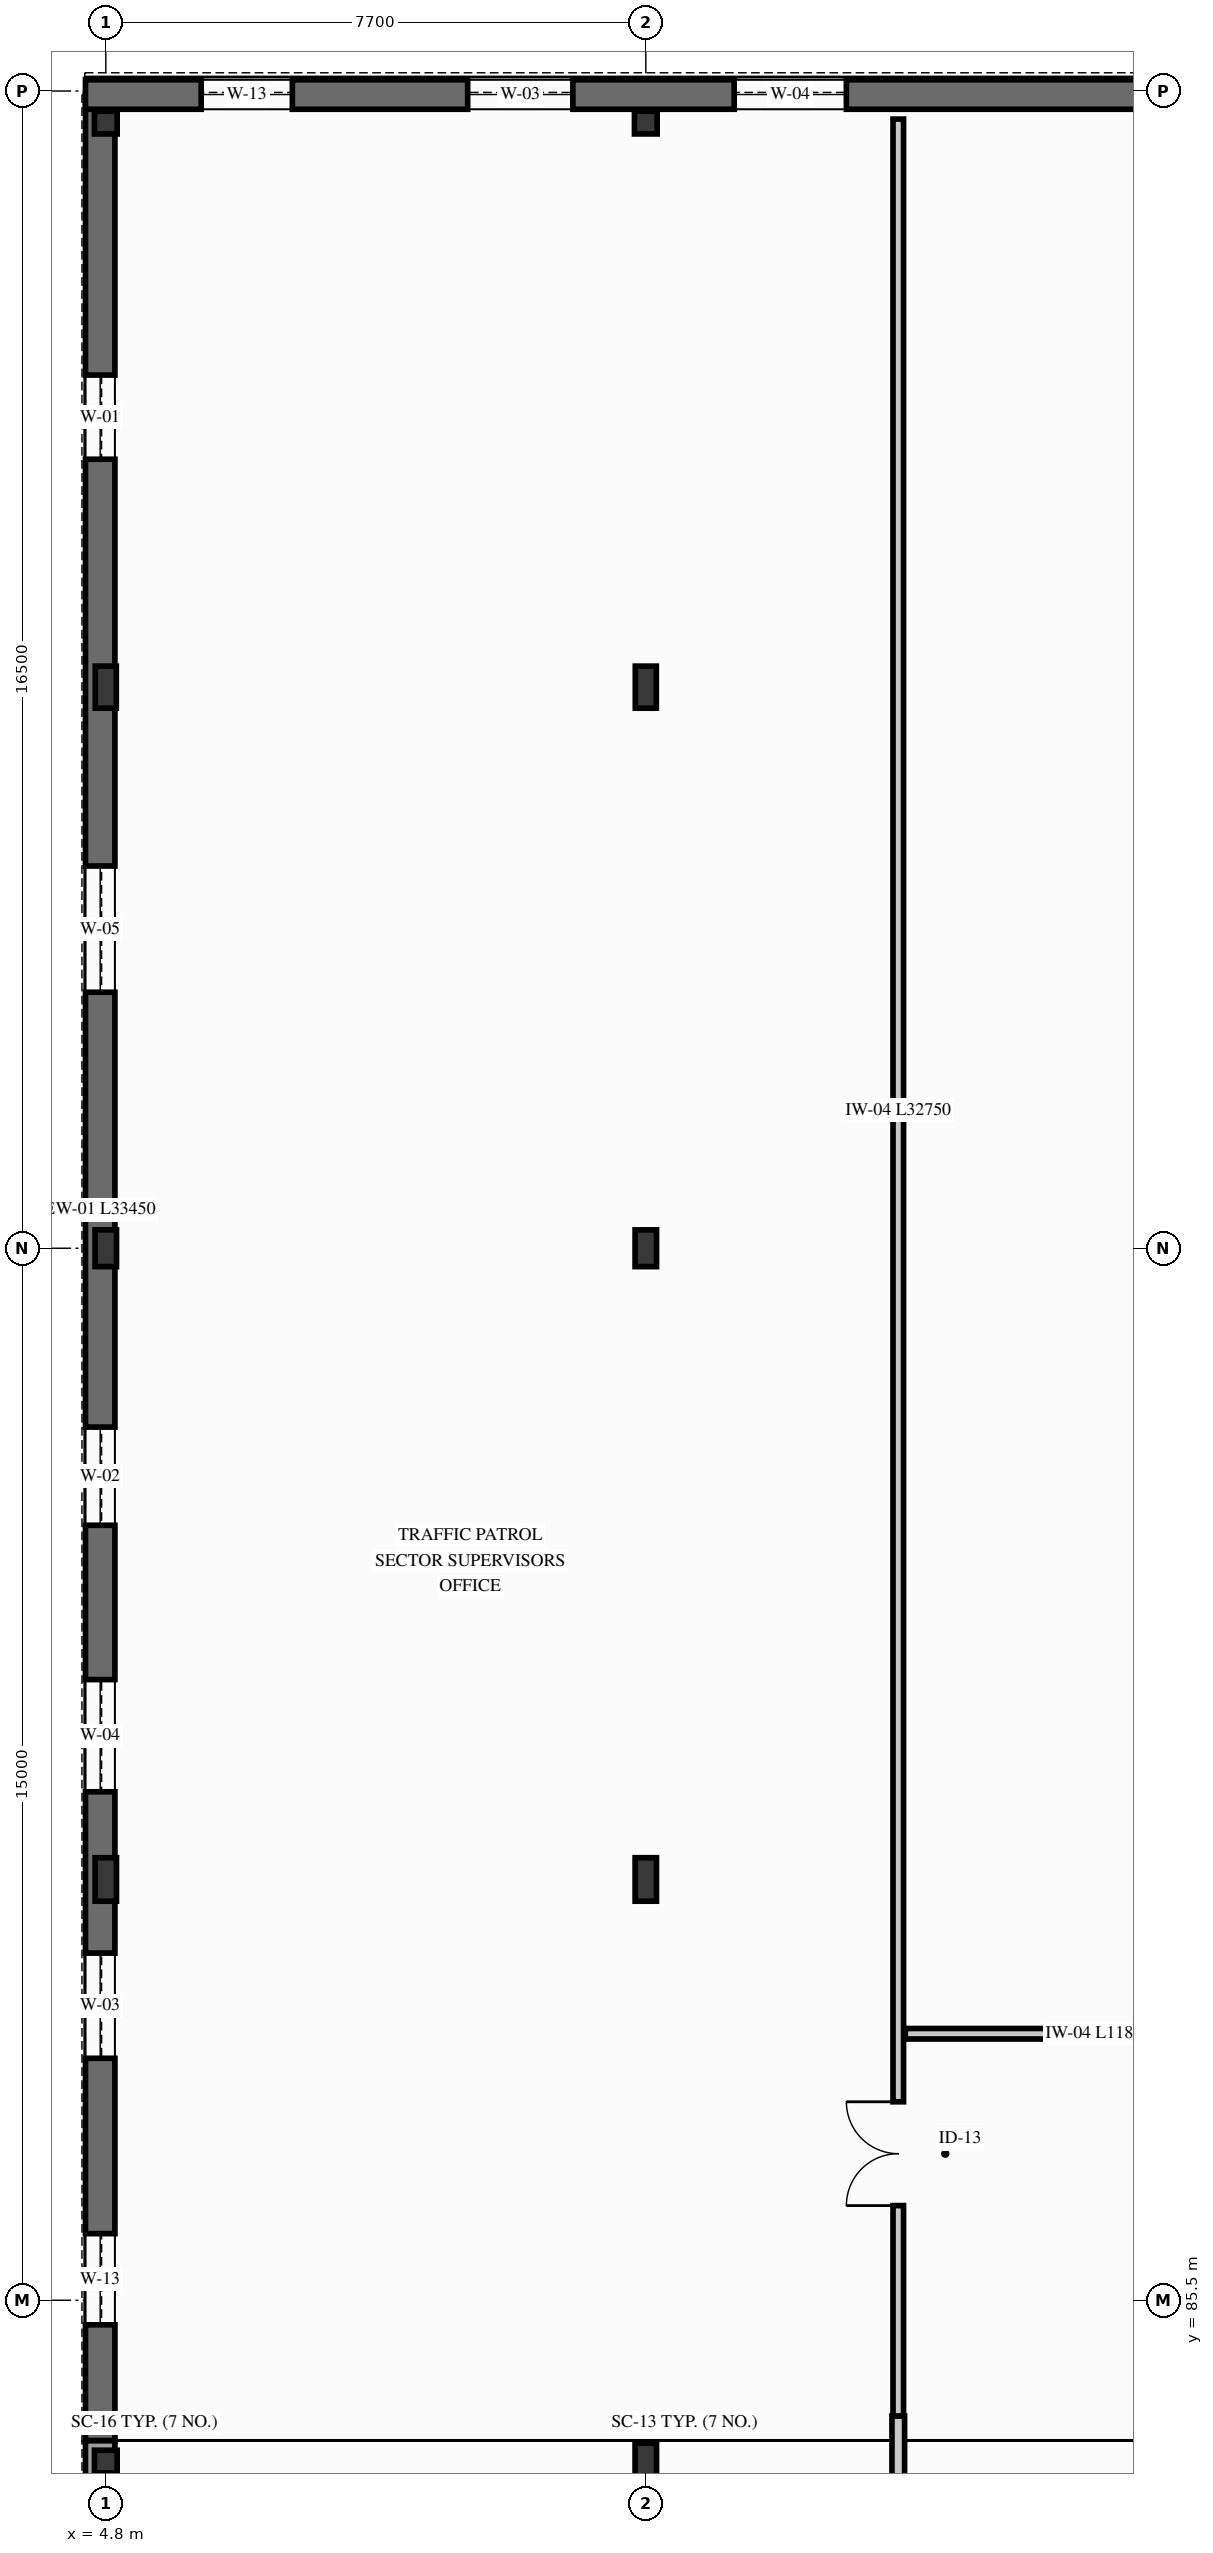
"""IFC4 building model, lengths in metres.
Left out: names, types, materials, properties, quantities, classifications, styles, units other than length and angle.
Written with IfcOpenShell. Run it as: python <this file> out.ifc"""

import sys

from ifc_helpers import new_model, si_unit, direction, frame, frame_2d, origin, origin_2d, place, context, subcontext, project, spatial, rectangle, hollow_circle, i_section, extrude, element, fill, save


model = new_model("IFC4")
c1 = context("Model", 3, precision=1e-05, world=origin(), true_north=direction((0.0, 1.0)))
c2 = subcontext(c1, "Body", "Model", "MODEL_VIEW")
j1 = project(units=[si_unit("LENGTHUNIT", "METRE"), si_unit("PLANEANGLEUNIT", "RADIAN")], contexts=[c1])
p1 = place(None, origin())
s1 = spatial("IfcSite", under=j1, at=p1, CompositionType="ELEMENT")
p2 = place(p1, origin())
s2 = spatial("IfcBuilding", under=s1, at=p2, CompositionType="ELEMENT")
p3 = place(p2, frame((0.0, 0.0, 5.1)))
s3 = spatial("IfcBuildingStorey", under=s2, at=p3, CompositionType="ELEMENT", Elevation=5.1)
p4 = place(p3, frame((4.8, 83.2, 0.0), z_axis=(0.0, 0.0, 1.0), x_axis=(1.0, 0.0, 0.0)))
e1 = element("IfcColumn", 1, at=p4, inside=s3, PredefinedType="COLUMN", context=c2, shape_type="SweptSolid", body=[
    extrude(hollow_circle(Radius=0.162, WallThickness=0.016, at=origin_2d()), origin(), (0.0, 0.0, 1.0), 4.2),
])
p5 = place(p3, frame((12.5, 83.2, 0.0), z_axis=(0.0, 0.0, 1.0), x_axis=(1.0, 0.0, 0.0)))
e2 = element("IfcColumn", 2, at=p5, inside=s3, PredefinedType="COLUMN", context=c2, shape_type="SweptSolid", body=[
    extrude(i_section(OverallWidth=0.306, OverallDepth=0.524, WebThickness=0.021, FlangeThickness=0.04, FilletRadius=0.027, at=origin_2d()), origin(), (0.0, 0.0, 1.0), 4.2),
])
p6 = place(p3, frame((4.8, 91.5, 0.0), z_axis=(0.0, 0.0, 1.0), x_axis=(1.0, 0.0, 0.0)))
e3 = element("IfcColumn", 3, at=p6, inside=s3, PredefinedType="COLUMN", context=c2, shape_type="SweptSolid", body=[
    extrude(i_section(OverallWidth=0.305, OverallDepth=0.62, WebThickness=0.021, FlangeThickness=0.04, FilletRadius=0.027, at=origin_2d()), origin(), (0.0, 0.0, 1.0), 4.02),
])
p7 = place(p3, frame((4.8, 100.5, 0.0), z_axis=(0.0, 0.0, 1.0), x_axis=(1.0, 0.0, 0.0)))
e4 = element("IfcColumn", 4, at=p7, inside=s3, PredefinedType="COLUMN", context=c2, shape_type="SweptSolid", body=[
    extrude(i_section(OverallWidth=0.306, OverallDepth=0.524, WebThickness=0.021, FlangeThickness=0.04, FilletRadius=0.027, at=origin_2d()), origin(), (0.0, 0.0, 1.0), 4.02),
])
p8 = place(p3, frame((4.8, 108.5, 0.0), z_axis=(0.0, 0.0, 1.0), x_axis=(1.0, 0.0, 0.0)))
e5 = element("IfcColumn", 5, at=p8, inside=s3, PredefinedType="COLUMN", context=c2, shape_type="SweptSolid", body=[
    extrude(i_section(OverallWidth=0.3, OverallDepth=0.6, WebThickness=0.015, FlangeThickness=0.03, FilletRadius=0.027, at=origin_2d()), origin(), (0.0, 0.0, 1.0), 4.02),
])
p9 = place(p3, frame((4.8, 116.55, 0.0), z_axis=(0.0, 0.0, 1.0), x_axis=(1.0, 0.0, 0.0)))
e6 = element("IfcColumn", 6, at=p9, inside=s3, PredefinedType="COLUMN", context=c2, shape_type="SweptSolid", body=[
    extrude(hollow_circle(Radius=0.162, WallThickness=0.016, at=origin_2d()), origin(), (0.0, 0.0, 1.0), 4.02),
])
p10 = place(p3, frame((12.5, 91.5, 0.0), z_axis=(0.0, 0.0, 1.0), x_axis=(1.0, 0.0, 0.0)))
e7 = element("IfcColumn", 7, at=p10, inside=s3, PredefinedType="COLUMN", context=c2, shape_type="SweptSolid", body=[
    extrude(i_section(OverallWidth=0.305, OverallDepth=0.62, WebThickness=0.021, FlangeThickness=0.04, FilletRadius=0.027, at=origin_2d()), origin(), (0.0, 0.0, 1.0), 3.94),
])
p11 = place(p3, frame((12.5, 100.5, 0.0), z_axis=(0.0, 0.0, 1.0), x_axis=(1.0, 0.0, 0.0)))
e8 = element("IfcColumn", 8, at=p11, inside=s3, PredefinedType="COLUMN", context=c2, shape_type="SweptSolid", body=[
    extrude(i_section(OverallWidth=0.306, OverallDepth=0.524, WebThickness=0.021, FlangeThickness=0.04, FilletRadius=0.027, at=origin_2d()), origin(), (0.0, 0.0, 1.0), 3.94),
])
p12 = place(p3, frame((12.5, 108.5, 0.0), z_axis=(0.0, 0.0, 1.0), x_axis=(1.0, 0.0, 0.0)))
e9 = element("IfcColumn", 9, at=p12, inside=s3, PredefinedType="COLUMN", context=c2, shape_type="SweptSolid", body=[
    extrude(i_section(OverallWidth=0.3, OverallDepth=0.6, WebThickness=0.015, FlangeThickness=0.03, FilletRadius=0.027, at=origin_2d()), origin(), (0.0, 0.0, 1.0), 3.94),
])
p13 = place(p3, frame((12.5, 116.55, 0.0), z_axis=(0.0, 0.0, 1.0), x_axis=(1.0, 0.0, 0.0)))
e10 = element("IfcColumn", 10, at=p13, inside=s3, PredefinedType="COLUMN", context=c2, shape_type="SweptSolid", body=[
    extrude(hollow_circle(Radius=0.162, WallThickness=0.016, at=origin_2d()), origin(), (0.0, 0.0, 1.0), 3.94),
])
p14 = place(p3, frame((4.72, 36.5, 0.0), z_axis=(0.0, 0.0, 1.0), x_axis=(0.0, 1.0, 0.0)))
e11 = element("IfcWall", 11, at=p14, inside=s3, PredefinedType="SOLIDWALL", context=c2, shape_type="SweptSolid", body=[
    extrude(rectangle(XDim=47.0, YDim=0.42, at=frame_2d((23.5, 0.0))), origin(), (0.0, 0.0, 1.0), 3.66),
])
p15 = place(p14, frame((1.65, 0.0, 0.74)))
e12 = element("IfcOpeningElement", 12, at=p15, cuts=e11, PredefinedType="OPENING", context=c2, shape_type="SweptSolid", body=[
    extrude(rectangle(XDim=1.6, YDim=2.4, at=frame_2d((0.8, 1.2))), frame((0.0, 0.22, 0.0), z_axis=(0.0, -1.0, 0.0), x_axis=(1.0, 0.0, 0.0)), (0.0, 0.0, 1.0), 0.44),
])
p16 = place(p14, frame((5.5, 0.0, 0.74)))
e13 = element("IfcOpeningElement", 13, at=p16, cuts=e11, PredefinedType="OPENING", context=c2, shape_type="SweptSolid", body=[
    extrude(rectangle(XDim=1.8, YDim=2.4, at=frame_2d((0.9, 1.2))), frame((0.0, 0.22, 0.0), z_axis=(0.0, -1.0, 0.0), x_axis=(1.0, 0.0, 0.0)), (0.0, 0.0, 1.0), 0.44),
])
p17 = place(p14, frame((9.35, 0.0, 0.84)))
e14 = element("IfcOpeningElement", 14, at=p17, cuts=e11, PredefinedType="OPENING", context=c2, shape_type="SweptSolid", body=[
    extrude(rectangle(XDim=1.5, YDim=2.3, at=frame_2d((0.75, 1.15))), frame((0.0, 0.22, 0.0), z_axis=(0.0, -1.0, 0.0), x_axis=(1.0, 0.0, 0.0)), (0.0, 0.0, 1.0), 0.44),
])
p18 = place(p14, frame((13.2, 0.0, 0.85)))
e15 = element("IfcOpeningElement", 15, at=p18, cuts=e11, PredefinedType="OPENING", context=c2, shape_type="SweptSolid", body=[
    extrude(rectangle(XDim=1.4, YDim=2.2, at=frame_2d((0.7, 1.1))), frame((0.0, 0.22, 0.0), z_axis=(0.0, -1.0, 0.0), x_axis=(1.0, 0.0, 0.0)), (0.0, 0.0, 1.0), 0.44),
])
p19 = place(p14, frame((20.9, 0.0, 0.74)))
e16 = element("IfcOpeningElement", 16, at=p19, cuts=e11, PredefinedType="OPENING", context=c2, shape_type="SweptSolid", body=[
    extrude(rectangle(XDim=2.4, YDim=2.4, at=frame_2d((1.2, 1.2))), frame((0.0, 0.22, 0.0), z_axis=(0.0, -1.0, 0.0), x_axis=(1.0, 0.0, 0.0)), (0.0, 0.0, 1.0), 0.44),
])
p20 = place(p14, frame((24.75, 0.0, 0.74)))
e17 = element("IfcOpeningElement", 17, at=p20, cuts=e11, PredefinedType="OPENING", context=c2, shape_type="SweptSolid", body=[
    extrude(rectangle(XDim=1.6, YDim=2.4, at=frame_2d((0.8, 1.2))), frame((0.0, 0.22, 0.0), z_axis=(0.0, -1.0, 0.0), x_axis=(1.0, 0.0, 0.0)), (0.0, 0.0, 1.0), 0.44),
])
p21 = place(p14, frame((28.6, 0.0, 0.74)))
e18 = element("IfcOpeningElement", 18, at=p21, cuts=e11, PredefinedType="OPENING", context=c2, shape_type="SweptSolid", body=[
    extrude(rectangle(XDim=1.8, YDim=2.4, at=frame_2d((0.9, 1.2))), frame((0.0, 0.22, 0.0), z_axis=(0.0, -1.0, 0.0), x_axis=(1.0, 0.0, 0.0)), (0.0, 0.0, 1.0), 0.44),
])
p22 = place(p14, frame((40.15, 0.0, 0.54)))
e19 = element("IfcOpeningElement", 19, at=p22, cuts=e11, PredefinedType="OPENING", context=c2, shape_type="SweptSolid", body=[
    extrude(rectangle(XDim=2.2, YDim=2.6, at=frame_2d((1.1, 1.3))), frame((0.0, 0.22, 0.0), z_axis=(0.0, -1.0, 0.0), x_axis=(1.0, 0.0, 0.0)), (0.0, 0.0, 1.0), 0.44),
])
p23 = place(p3, frame((4.72, 83.5, 0.0), z_axis=(0.0, 0.0, 1.0), x_axis=(0.0, 1.0, 0.0)))
e20 = element("IfcWall", 20, at=p23, inside=s3, PredefinedType="SOLIDWALL", context=c2, shape_type="SweptSolid", body=[
    extrude(rectangle(XDim=33.45, YDim=0.42, at=frame_2d((16.725, 0.0))), origin(), (0.0, 0.0, 1.0), 3.94),
])
p24 = place(p23, frame((1.65, 0.0, 0.85)))
e21 = element("IfcOpeningElement", 21, at=p24, cuts=e20, PredefinedType="OPENING", context=c2, shape_type="SweptSolid", body=[
    extrude(rectangle(XDim=1.3, YDim=2.15, at=frame_2d((0.65, 1.075))), frame((0.0, 0.22, 0.0), z_axis=(0.0, -1.0, 0.0), x_axis=(1.0, 0.0, 0.0)), (0.0, 0.0, 1.0), 0.44),
])
p25 = place(p23, frame((5.45, 0.0, 0.85)))
e22 = element("IfcOpeningElement", 22, at=p25, cuts=e20, PredefinedType="OPENING", context=c2, shape_type="SweptSolid", body=[
    extrude(rectangle(XDim=1.5, YDim=2.3, at=frame_2d((0.75, 1.15))), frame((0.0, 0.22, 0.0), z_axis=(0.0, -1.0, 0.0), x_axis=(1.0, 0.0, 0.0)), (0.0, 0.0, 1.0), 0.44),
])
p26 = place(p23, frame((9.25, 0.0, 0.85)))
e23 = element("IfcOpeningElement", 23, at=p26, cuts=e20, PredefinedType="OPENING", context=c2, shape_type="SweptSolid", body=[
    extrude(rectangle(XDim=1.6, YDim=2.4, at=frame_2d((0.8, 1.2))), frame((0.0, 0.22, 0.0), z_axis=(0.0, -1.0, 0.0), x_axis=(1.0, 0.0, 0.0)), (0.0, 0.0, 1.0), 0.44),
])
p27 = place(p23, frame((13.05, 0.0, 0.85)))
e24 = element("IfcOpeningElement", 24, at=p27, cuts=e20, PredefinedType="OPENING", context=c2, shape_type="SweptSolid", body=[
    extrude(rectangle(XDim=1.4, YDim=2.2, at=frame_2d((0.7, 1.1))), frame((0.0, 0.22, 0.0), z_axis=(0.0, -1.0, 0.0), x_axis=(1.0, 0.0, 0.0)), (0.0, 0.0, 1.0), 0.44),
])
p28 = place(p23, frame((20.65, 0.0, 0.85)))
e25 = element("IfcOpeningElement", 25, at=p28, cuts=e20, PredefinedType="OPENING", context=c2, shape_type="SweptSolid", body=[
    extrude(rectangle(XDim=1.8, YDim=2.4, at=frame_2d((0.9, 1.2))), frame((0.0, 0.22, 0.0), z_axis=(0.0, -1.0, 0.0), x_axis=(1.0, 0.0, 0.0)), (0.0, 0.0, 1.0), 0.44),
])
p29 = place(p23, frame((28.25, 0.0, 0.85)))
e26 = element("IfcOpeningElement", 26, at=p29, cuts=e20, PredefinedType="OPENING", context=c2, shape_type="SweptSolid", body=[
    extrude(rectangle(XDim=1.2, YDim=2.1, at=frame_2d((0.6, 1.05))), frame((0.0, 0.22, 0.0), z_axis=(0.0, -1.0, 0.0), x_axis=(1.0, 0.0, 0.0)), (0.0, 0.0, 1.0), 0.44),
])
p30 = place(p3, frame((4.51, 116.95, 0.0), z_axis=(0.0, 0.0, 1.0), x_axis=(1.0, 0.0, 0.0)))
e27 = element("IfcWall", 27, at=p30, inside=s3, PredefinedType="SOLIDWALL", context=c2, shape_type="SweptSolid", body=[
    extrude(rectangle(XDim=23.99, YDim=0.42, at=frame_2d((11.995, 0.0))), origin(), (0.0, 0.0, 1.0), 3.94),
])
p31 = place(p30, frame((1.65, 0.0, 0.85)))
e28 = element("IfcOpeningElement", 28, at=p31, cuts=e27, PredefinedType="OPENING", context=c2, shape_type="SweptSolid", body=[
    extrude(rectangle(XDim=1.3, YDim=2.15, at=frame_2d((0.65, 1.075))), frame((0.0, 0.22, 0.0), z_axis=(0.0, -1.0, 0.0), x_axis=(1.0, 0.0, 0.0)), (0.0, 0.0, 1.0), 0.44),
])
p32 = place(p30, frame((5.45, 0.0, 0.85)))
e29 = element("IfcOpeningElement", 29, at=p32, cuts=e27, PredefinedType="OPENING", context=c2, shape_type="SweptSolid", body=[
    extrude(rectangle(XDim=1.5, YDim=2.3, at=frame_2d((0.75, 1.15))), frame((0.0, 0.22, 0.0), z_axis=(0.0, -1.0, 0.0), x_axis=(1.0, 0.0, 0.0)), (0.0, 0.0, 1.0), 0.44),
])
p33 = place(p30, frame((9.25, 0.0, 0.85)))
e30 = element("IfcOpeningElement", 30, at=p33, cuts=e27, PredefinedType="OPENING", context=c2, shape_type="SweptSolid", body=[
    extrude(rectangle(XDim=1.6, YDim=2.4, at=frame_2d((0.8, 1.2))), frame((0.0, 0.22, 0.0), z_axis=(0.0, -1.0, 0.0), x_axis=(1.0, 0.0, 0.0)), (0.0, 0.0, 1.0), 0.44),
])
p34 = place(p30, frame((16.85, 0.0, 0.85)))
e31 = element("IfcOpeningElement", 31, at=p34, cuts=e27, PredefinedType="OPENING", context=c2, shape_type="SweptSolid", body=[
    extrude(rectangle(XDim=1.7, YDim=2.35, at=frame_2d((0.85, 1.175))), frame((0.0, 0.22, 0.0), z_axis=(0.0, -1.0, 0.0), x_axis=(1.0, 0.0, 0.0)), (0.0, 0.0, 1.0), 0.44),
])
p35 = place(p3, frame((16.1, 72.75, 0.0), z_axis=(0.0, 0.0, 1.0), x_axis=(0.0, 1.0, 0.0)))
e32 = element("IfcWall", 32, at=p35, inside=s3, PredefinedType="PARTITIONING", context=c2, shape_type="SweptSolid", body=[
    extrude(rectangle(XDim=11.1, YDim=0.18, at=frame_2d((5.55, 0.0))), origin(), (0.0, 0.0, 1.0), 3.658),
])
p36 = place(p35, frame((4.5, 0.0, 0.0)))
e33 = element("IfcOpeningElement", 33, at=p36, cuts=e32, PredefinedType="OPENING", context=c2, shape_type="SweptSolid", body=[
    extrude(rectangle(XDim=1.05, YDim=2.2, at=frame_2d((0.525, 1.1))), frame((0.0, 0.1, 0.0), z_axis=(0.0, -1.0, 0.0), x_axis=(1.0, 0.0, 0.0)), (0.0, 0.0, 1.0), 0.2),
])
p37 = place(p3, frame((16.1, 83.85, 0.0), z_axis=(0.0, 0.0, 1.0), x_axis=(0.0, 1.0, 0.0)))
e34 = element("IfcWall", 34, at=p37, inside=s3, PredefinedType="PARTITIONING", context=c2, shape_type="SweptSolid", body=[
    extrude(rectangle(XDim=32.75, YDim=0.15, at=frame_2d((16.375, 0.0))), origin(), (0.0, 0.0, 1.0), 3.92),
])
p38 = place(p37, frame((3.0, 0.0, 0.0)))
e35 = element("IfcOpeningElement", 35, at=p38, cuts=e34, PredefinedType="OPENING", context=c2, shape_type="SweptSolid", body=[
    extrude(rectangle(XDim=1.48, YDim=2.28, at=frame_2d((0.74, 1.14))), frame((0.0, 0.085, 0.0), z_axis=(0.0, -1.0, 0.0), x_axis=(1.0, 0.0, 0.0)), (0.0, 0.0, 1.0), 0.17),
])
p39 = place(p3, frame((16.2, 89.3, 0.0), z_axis=(0.0, 0.0, 1.0), x_axis=(1.0, 0.0, 0.0)))
e36 = element("IfcWall", 36, at=p39, inside=s3, PredefinedType="PARTITIONING", context=c2, shape_type="SweptSolid", body=[
    extrude(rectangle(XDim=11.85, YDim=0.15, at=frame_2d((5.925, 0.0))), origin(), (0.0, 0.0, 1.0), 3.92),
])
p40 = place(p39, frame((5.5, 0.0, 0.0)))
e37 = element("IfcOpeningElement", 37, at=p40, cuts=e36, PredefinedType="OPENING", context=c2, shape_type="SweptSolid", body=[
    extrude(rectangle(XDim=0.98, YDim=2.16, at=frame_2d((0.49, 1.08))), frame((0.0, 0.085, 0.0), z_axis=(0.0, -1.0, 0.0), x_axis=(1.0, 0.0, 0.0)), (0.0, 0.0, 1.0), 0.17),
])
p41 = place(p24, origin())
e38 = element("IfcWindow", 38, at=p41, inside=s3, PartitioningType="SINGLE_PANEL", PredefinedType="WINDOW", context=c2, shape_type="SweptSolid", body=[
    extrude(rectangle(XDim=1.3, YDim=2.15, at=frame_2d((0.65, 1.075))), frame((0.0, 0.03, 0.0), z_axis=(0.0, -1.0, 0.0), x_axis=(1.0, 0.0, 0.0)), (0.0, 0.0, 1.0), 0.06),
])
fill(e21, e38)
p42 = place(p25, origin())
e39 = element("IfcWindow", 39, at=p42, inside=s3, PartitioningType="SINGLE_PANEL", PredefinedType="WINDOW", context=c2, shape_type="SweptSolid", body=[
    extrude(rectangle(XDim=1.5, YDim=2.3, at=frame_2d((0.75, 1.15))), frame((0.0, 0.03, 0.0), z_axis=(0.0, -1.0, 0.0), x_axis=(1.0, 0.0, 0.0)), (0.0, 0.0, 1.0), 0.06),
])
fill(e22, e39)
p43 = place(p26, origin())
e40 = element("IfcWindow", 40, at=p43, inside=s3, PartitioningType="SINGLE_PANEL", PredefinedType="WINDOW", context=c2, shape_type="SweptSolid", body=[
    extrude(rectangle(XDim=1.6, YDim=2.4, at=frame_2d((0.8, 1.2))), frame((0.0, 0.03, 0.0), z_axis=(0.0, -1.0, 0.0), x_axis=(1.0, 0.0, 0.0)), (0.0, 0.0, 1.0), 0.06),
])
fill(e23, e40)
p44 = place(p27, origin())
e41 = element("IfcWindow", 41, at=p44, inside=s3, PartitioningType="SINGLE_PANEL", PredefinedType="WINDOW", context=c2, shape_type="SweptSolid", body=[
    extrude(rectangle(XDim=1.4, YDim=2.2, at=frame_2d((0.7, 1.1))), frame((0.0, 0.03, 0.0), z_axis=(0.0, -1.0, 0.0), x_axis=(1.0, 0.0, 0.0)), (0.0, 0.0, 1.0), 0.06),
])
fill(e24, e41)
p45 = place(p28, origin())
e42 = element("IfcWindow", 42, at=p45, inside=s3, PartitioningType="SINGLE_PANEL", PredefinedType="WINDOW", context=c2, shape_type="SweptSolid", body=[
    extrude(rectangle(XDim=1.8, YDim=2.4, at=frame_2d((0.9, 1.2))), frame((0.0, 0.03, 0.0), z_axis=(0.0, -1.0, 0.0), x_axis=(1.0, 0.0, 0.0)), (0.0, 0.0, 1.0), 0.06),
])
fill(e25, e42)
p46 = place(p29, origin())
e43 = element("IfcWindow", 43, at=p46, inside=s3, PartitioningType="SINGLE_PANEL", PredefinedType="WINDOW", context=c2, shape_type="SweptSolid", body=[
    extrude(rectangle(XDim=1.2, YDim=2.1, at=frame_2d((0.6, 1.05))), frame((0.0, 0.03, 0.0), z_axis=(0.0, -1.0, 0.0), x_axis=(1.0, 0.0, 0.0)), (0.0, 0.0, 1.0), 0.06),
])
fill(e26, e43)
p47 = place(p31, origin())
e44 = element("IfcWindow", 44, at=p47, inside=s3, PartitioningType="SINGLE_PANEL", PredefinedType="WINDOW", context=c2, shape_type="SweptSolid", body=[
    extrude(rectangle(XDim=1.3, YDim=2.15, at=frame_2d((0.65, 1.075))), frame((0.0, 0.03, 0.0), z_axis=(0.0, -1.0, 0.0), x_axis=(1.0, 0.0, 0.0)), (0.0, 0.0, 1.0), 0.06),
])
fill(e28, e44)
p48 = place(p32, origin())
e45 = element("IfcWindow", 45, at=p48, inside=s3, PartitioningType="SINGLE_PANEL", PredefinedType="WINDOW", context=c2, shape_type="SweptSolid", body=[
    extrude(rectangle(XDim=1.5, YDim=2.3, at=frame_2d((0.75, 1.15))), frame((0.0, 0.03, 0.0), z_axis=(0.0, -1.0, 0.0), x_axis=(1.0, 0.0, 0.0)), (0.0, 0.0, 1.0), 0.06),
])
fill(e29, e45)
p49 = place(p33, origin())
e46 = element("IfcWindow", 46, at=p49, inside=s3, PartitioningType="SINGLE_PANEL", PredefinedType="WINDOW", context=c2, shape_type="SweptSolid", body=[
    extrude(rectangle(XDim=1.6, YDim=2.4, at=frame_2d((0.8, 1.2))), frame((0.0, 0.03, 0.0), z_axis=(0.0, -1.0, 0.0), x_axis=(1.0, 0.0, 0.0)), (0.0, 0.0, 1.0), 0.06),
])
fill(e30, e46)
p50 = place(p38, origin())
e47 = element("IfcDoor", 47, at=p50, inside=s3, OperationType="DOUBLE_DOOR_SINGLE_SWING", PredefinedType="DOOR", context=c2, shape_type="SweptSolid", body=[
    extrude(rectangle(XDim=1.48, YDim=2.28, at=frame_2d((0.74, 1.14))), frame((0.0, 0.025, 0.0), z_axis=(0.0, -1.0, 0.0), x_axis=(1.0, 0.0, 0.0)), (0.0, 0.0, 1.0), 0.05),
])
fill(e35, e47)
save(model, sys.argv[1])
